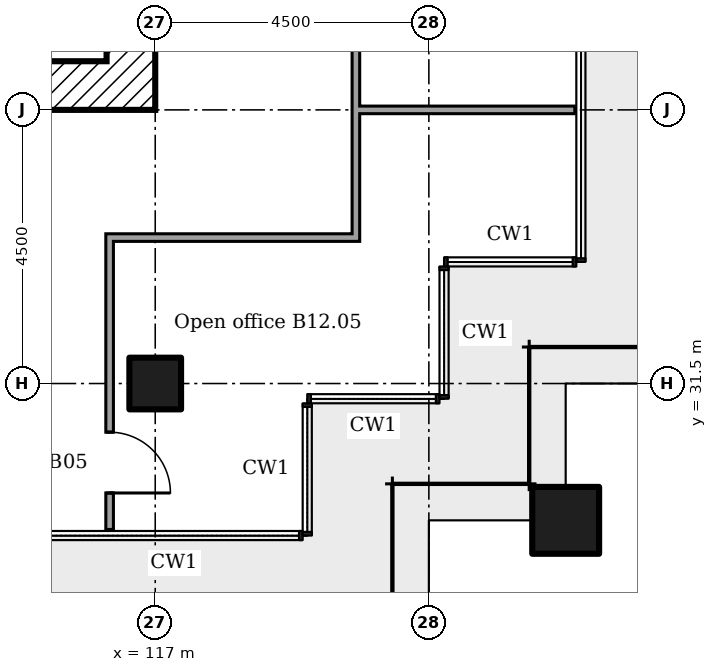
"""IFC4 building model, lengths in metres.
Left out: names, types, materials, properties, quantities, classifications, styles, units other than length and angle.
Written with IfcOpenShell. Run it as: python <this file> out.ifc"""

import sys

from ifc_helpers import new_model, si_unit, direction, frame, frame_2d, origin, origin_2d, place, context, subcontext, project, spatial, rectangle, extrude, element, fill, save


model = new_model("IFC4")
c1 = context("Model", 3, precision=1e-05, world=origin(), true_north=direction((0.0, 1.0)))
c2 = subcontext(c1, "Body", "Model", "MODEL_VIEW")
j1 = project(units=[si_unit("LENGTHUNIT", "METRE"), si_unit("PLANEANGLEUNIT", "RADIAN")], contexts=[c1])
p1 = place(None, origin())
s1 = spatial("IfcSite", under=j1, at=p1, CompositionType="ELEMENT")
p2 = place(p1, origin())
s2 = spatial("IfcBuilding", under=s1, at=p2, CompositionType="ELEMENT")
p3 = place(p2, frame((0.0, 0.0, 54.6)))
s3 = spatial("IfcBuildingStorey", under=s2, at=p3, CompositionType="ELEMENT", Elevation=54.6)
p4 = place(p3, frame((123.75, 29.25, 0.0)))
e1 = element("IfcColumn", 1, at=p4, inside=s3, PredefinedType="COLUMN", context=c2, shape_type="SweptSolid", body=[
    extrude(rectangle(XDim=1.1, YDim=1.1, at=origin_2d()), origin(), (0.0, 0.0, 1.0), 3.6),
])
p5 = place(p3, frame((117.0, 31.5, 0.0)))
e2 = element("IfcColumn", 2, at=p5, inside=s3, PredefinedType="COLUMN", context=c2, shape_type="SweptSolid", body=[
    extrude(rectangle(XDim=0.85, YDim=0.85, at=origin_2d()), origin(), (0.0, 0.0, 1.0), 3.6),
])
p6 = place(p3, frame((116.6, 36.0, 0.0), z_axis=(0.0, 0.0, 1.0), x_axis=(0.0, 1.0, 0.0)))
e3 = element("IfcWall", 3, at=p6, inside=s3, PredefinedType="SHEAR", context=c2, shape_type="SweptSolid", body=[
    extrude(rectangle(XDim=13.5, YDim=0.8, at=frame_2d((6.75, 0.0))), origin(), (0.0, 0.0, 1.0), 3.35),
])
p7 = place(p6, frame((3.7, 0.0, 0.0)))
e4 = element("IfcOpeningElement", 4, at=p7, cuts=e3, PredefinedType="OPENING", context=c2, shape_type="SweptSolid", body=[
    extrude(rectangle(XDim=1.2, YDim=2.1, at=frame_2d((0.6, 1.05))), frame((0.0, 0.41, 0.0), z_axis=(0.0, -1.0, 0.0), x_axis=(1.0, 0.0, 0.0)), (0.0, 0.0, 1.0), 0.82),
])
p8 = place(p6, frame((6.275, 0.0, 0.0)))
e5 = element("IfcOpeningElement", 5, at=p8, cuts=e3, PredefinedType="OPENING", context=c2, shape_type="SweptSolid", body=[
    extrude(rectangle(XDim=1.0, YDim=2.1, at=frame_2d((0.5, 1.05))), frame((0.0, 0.41, 0.0), z_axis=(0.0, -1.0, 0.0), x_axis=(1.0, 0.0, 0.0)), (0.0, 0.0, 1.0), 0.82),
])
p9 = place(p3, frame((104.3, 36.4, 0.0)))
e6 = element("IfcWall", 6, at=p9, inside=s3, PredefinedType="SHEAR", context=c2, shape_type="SweptSolid", body=[
    extrude(rectangle(XDim=11.9, YDim=0.8, at=frame_2d((5.95, 0.0))), origin(), (0.0, 0.0, 1.0), 3.35),
])
p10 = place(p3, frame((116.188, 33.9, 0.0)))
e7 = element("IfcWall", 7, at=p10, inside=s3, PredefinedType="PARTITIONING", context=c2, shape_type="SweptSolid", body=[
    extrude(rectangle(XDim=4.175, YDim=0.125, at=frame_2d((2.087, 0.0))), origin(), (0.0, 0.0, 1.0), 3.45),
])
p11 = place(p3, frame((120.3, 36.0, 0.0)))
e8 = element("IfcWall", 8, at=p11, inside=s3, PredefinedType="PARTITIONING", context=c2, shape_type="SweptSolid", body=[
    extrude(rectangle(XDim=3.6, YDim=0.125, at=frame_2d((1.8, 0.0))), origin(), (0.0, 0.0, 1.0), 2.851),
])
p12 = place(p3, frame((116.25, 29.1, 0.0), z_axis=(0.0, 0.0, 1.0), x_axis=(0.0, 1.0, 0.0)))
e9 = element("IfcWall", 9, at=p12, inside=s3, PredefinedType="PARTITIONING", context=c2, shape_type="SweptSolid", body=[
    extrude(rectangle(XDim=4.737, YDim=0.125, at=frame_2d((2.369, 0.0))), origin(), (0.0, 0.0, 1.0), 3.45),
])
p13 = place(p12, frame((0.6, 0.0, 0.0)))
e10 = element("IfcOpeningElement", 10, at=p13, cuts=e9, PredefinedType="OPENING", context=c2, shape_type="SweptSolid", body=[
    extrude(rectangle(XDim=1.0, YDim=2.1, at=frame_2d((0.5, 1.05))), frame((0.0, 0.073, 0.0), z_axis=(0.0, -1.0, 0.0), x_axis=(1.0, 0.0, 0.0)), (0.0, 0.0, 1.0), 0.145),
])
p14 = place(p3, frame((120.3, 33.962, 0.0), z_axis=(0.0, 0.0, 1.0), x_axis=(0.0, 1.0, 0.0)))
e11 = element("IfcWall", 11, at=p14, inside=s3, PredefinedType="PARTITIONING", context=c2, shape_type="SweptSolid", body=[
    extrude(rectangle(XDim=18.175, YDim=0.125, at=frame_2d((9.087, 0.0))), origin(), (0.0, 0.0, 1.0), 3.45),
])
p15 = place(p14, frame((7.28, 0.0, 0.0)))
e12 = element("IfcOpeningElement", 12, at=p15, cuts=e11, PredefinedType="OPENING", context=c2, shape_type="SweptSolid", body=[
    extrude(rectangle(XDim=1.0, YDim=2.1, at=frame_2d((0.5, 1.05))), frame((0.0, 0.073, 0.0), z_axis=(0.0, -1.0, 0.0), x_axis=(1.0, 0.0, 0.0)), (0.0, 0.0, 1.0), 0.145),
])
p16 = place(p14, frame((12.788, 0.0, 0.0)))
e13 = element("IfcOpeningElement", 13, at=p16, cuts=e11, PredefinedType="OPENING", context=c2, shape_type="SweptSolid", body=[
    extrude(rectangle(XDim=1.0, YDim=2.1, at=frame_2d((0.5, 1.05))), frame((0.0, 0.073, 0.0), z_axis=(0.0, -1.0, 0.0), x_axis=(1.0, 0.0, 0.0)), (0.0, 0.0, 1.0), 0.145),
])
p17 = place(p14, frame((16.248, 0.0, 0.0)))
e14 = element("IfcOpeningElement", 14, at=p17, cuts=e11, PredefinedType="OPENING", context=c2, shape_type="SweptSolid", body=[
    extrude(rectangle(XDim=1.0, YDim=2.1, at=frame_2d((0.5, 1.05))), frame((0.0, 0.073, 0.0), z_axis=(0.0, -1.0, 0.0), x_axis=(1.0, 0.0, 0.0)), (0.0, 0.0, 1.0), 0.145),
])
p18 = place(p13, frame((1.0, 0.0, 0.0), x_axis=(-1.0, 0.0, 0.0)))
e15 = element("IfcDoor", 15, at=p18, inside=s3, OperationType="SINGLE_SWING_LEFT", PredefinedType="DOOR", context=c2, shape_type="SweptSolid", body=[
    extrude(rectangle(XDim=1.0, YDim=2.1, at=frame_2d((0.5, 1.05))), frame((0.0, 0.025, 0.0), z_axis=(0.0, -1.0, 0.0), x_axis=(1.0, 0.0, 0.0)), (0.0, 0.0, 1.0), 0.05),
])
fill(e10, e15)
save(model, sys.argv[1])
